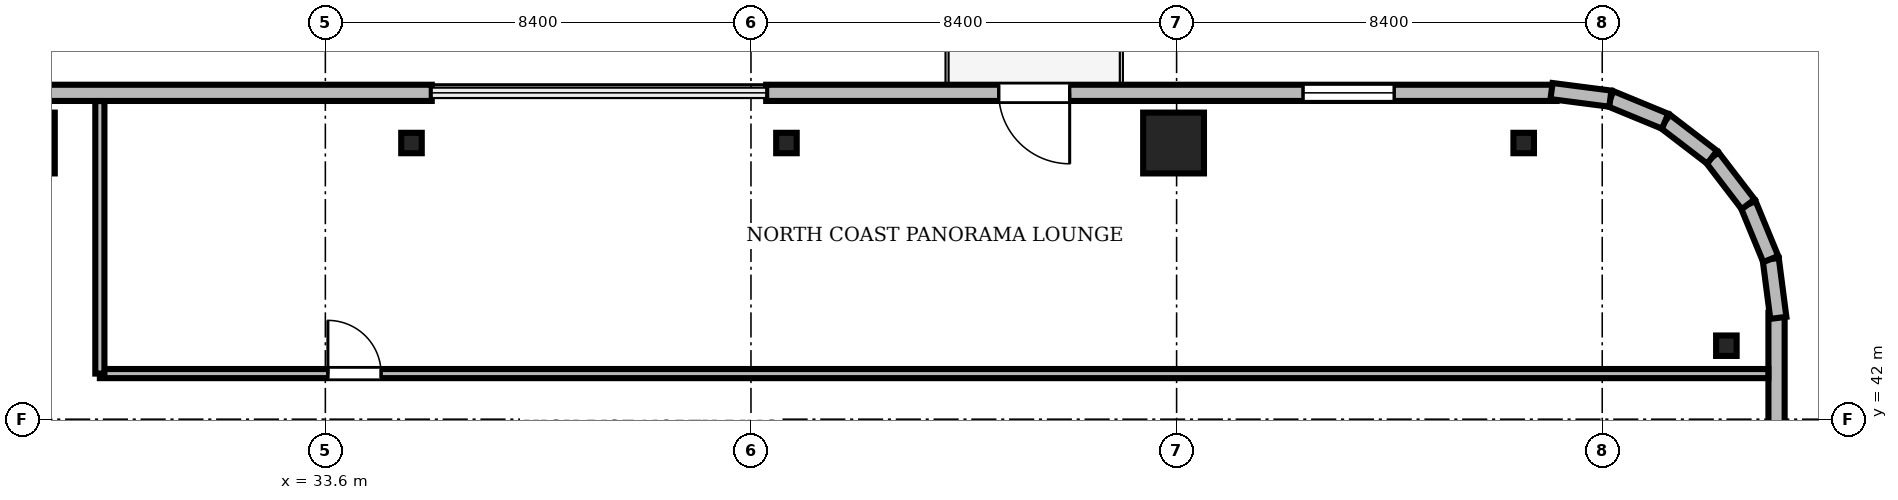
"""IFC4 building model, lengths in metres.
Left out: names, types, materials, properties, quantities, classifications, styles, units other than length and angle.
Written with IfcOpenShell. Run it as: python <this file> out.ifc"""

import sys

from ifc_helpers import new_model, si_unit, direction, frame, frame_2d, origin, origin_2d, place, context, subcontext, project, spatial, rectangle, i_section, extrude, source, transform, mapped, element, fill, save


model = new_model("IFC4")
c1 = context("Model", 3, precision=1e-05, world=origin(), true_north=direction((0.0, 1.0)))
c2 = subcontext(c1, "Body", "Model", "MODEL_VIEW")
j1 = project(units=[si_unit("LENGTHUNIT", "METRE"), si_unit("PLANEANGLEUNIT", "RADIAN")], contexts=[c1])
p1 = place(None, origin())
s1 = spatial("IfcSite", under=j1, at=p1, CompositionType="ELEMENT")
p2 = place(p1, origin())
s2 = spatial("IfcBuilding", under=s1, at=p2, CompositionType="ELEMENT")
p3 = place(p2, frame((0.0, 0.0, 250.6)))
s3 = spatial("IfcBuildingStorey", under=s2, at=p3, CompositionType="ELEMENT", Elevation=250.6)
m1 = source(origin(), c2, "Body", "SweptSolid", [
    extrude(rectangle(XDim=1.2, YDim=1.2, at=origin_2d()), origin(), (0.0, 0.0, 1.0), 3.65),
])
for number, where, z_axis, x_axis in (
    (1, (50.34, 47.45, 0.0), (0.0, 0.0, 1.0), (1.0, 0.0, 0.0)),
    (2, (27.66, 47.45, 0.0), (0.0, 0.0, 1.0), (1.0, 0.0, 0.0)),
):
    element("IfcColumn", number, at=place(p3, frame(where, z_axis=z_axis, x_axis=x_axis)), inside=s3, PredefinedType="COLUMN", context=c2, shape_type="MappedRepresentation", body=[
        mapped(m1, transform((0.0, 0.0, 0.0), scale=1.0)),
    ])
m2 = source(origin(), c2, "Body", "SweptSolid", [
    extrude(i_section(OverallWidth=0.405, OverallDepth=0.403, WebThickness=0.018, FlangeThickness=0.028, FilletRadius=0.015, at=origin_2d()), origin(), (0.0, 0.0, 1.0), 3.65),
])
for number, where, z_axis, x_axis in (
    (3, (61.25, 43.45, 0.0), (0.0, 0.0, 1.0), (1.0, 0.0, 0.0)),
    (4, (57.25, 47.45, 0.0), (0.0, 0.0, 1.0), (1.0, 0.0, 0.0)),
    (5, (42.7, 47.45, 0.0), (0.0, 0.0, 1.0), (1.0, 0.0, 0.0)),
    (6, (35.3, 47.45, 0.0), (0.0, 0.0, 1.0), (1.0, 0.0, 0.0)),
):
    element("IfcColumn", number, at=place(p3, frame(where, z_axis=z_axis, x_axis=x_axis)), inside=s3, PredefinedType="COLUMN", context=c2, shape_type="MappedRepresentation", body=[
        mapped(m2, transform((0.0, 0.0, 0.0), scale=1.0)),
    ])
m3 = source(origin(), c2, "Body", "SweptSolid", [
    extrude(rectangle(XDim=15.6, YDim=0.32, at=frame_2d((7.8, 0.0))), origin(), (0.0, 0.0, 1.0), 3.65),
])
p4 = place(p3, frame((57.9, 48.44, 0.0), z_axis=(0.0, 0.0, 1.0), x_axis=(-1.0, 0.0, 0.0)))
e7 = element("IfcWall", 7, at=p4, inside=s3, PredefinedType="SOLIDWALL", context=c2, shape_type="MappedRepresentation", body=[
    mapped(m3, transform((0.0, 0.0, 0.0), scale=1.0)),
])
m4 = source(origin(), c2, "Body", "SweptSolid", [
    extrude(rectangle(XDim=1.4, YDim=2.3, at=frame_2d((0.7, 1.15))), frame((0.0, 0.17, 0.0), z_axis=(0.0, -1.0, 0.0), x_axis=(1.0, 0.0, 0.0)), (0.0, 0.0, 1.0), 0.34),
])
p5 = place(p4, frame((9.61, 0.0, 0.0)))
e8 = element("IfcOpeningElement", 8, at=p5, cuts=e7, PredefinedType="OPENING", context=c2, shape_type="MappedRepresentation", body=[
    mapped(m4, transform((0.0, 0.0, 0.0), scale=1.0)),
])
m5 = source(origin(), c2, "Body", "SweptSolid", [
    extrude(rectangle(XDim=1.8, YDim=2.4, at=frame_2d((0.9, 1.2))), frame((0.0, 0.17, 0.0), z_axis=(0.0, -1.0, 0.0), x_axis=(1.0, 0.0, 0.0)), (0.0, 0.0, 1.0), 0.34),
])
p6 = place(p4, frame((3.205, 0.0, 0.72)))
e9 = element("IfcOpeningElement", 9, at=p6, cuts=e7, PredefinedType="OPENING", context=c2, shape_type="MappedRepresentation", body=[
    mapped(m5, transform((0.0, 0.0, 0.0), scale=1.0)),
])
p7 = place(p3, frame((35.7, 48.44, 0.0), z_axis=(0.0, 0.0, 1.0), x_axis=(-1.0, 0.0, 0.0)))
e10 = element("IfcWall", 10, at=p7, inside=s3, PredefinedType="SOLIDWALL", context=c2, shape_type="MappedRepresentation", body=[
    mapped(m3, transform((0.0, 0.0, 0.0), scale=1.0)),
])
p8 = place(p7, frame((10.595, 0.0, 0.72)))
e11 = element("IfcOpeningElement", 11, at=p8, cuts=e10, PredefinedType="OPENING", context=c2, shape_type="MappedRepresentation", body=[
    mapped(m5, transform((0.0, 0.0, 0.0), scale=1.0)),
])
m6 = source(origin(), c2, "Body", "SweptSolid", [
    extrude(rectangle(XDim=15.6, YDim=0.32, at=frame_2d((7.8, 0.0))), origin(), (0.0, 0.0, 1.0), 3.65),
])
p9 = place(p3, frame((62.24, 28.5, 0.0), z_axis=(0.0, 0.0, 1.0), x_axis=(0.0, 1.0, 0.0)))
e12 = element("IfcWall", 12, at=p9, inside=s3, PredefinedType="SOLIDWALL", context=c2, shape_type="MappedRepresentation", body=[
    mapped(m6, transform((0.0, 0.0, 0.0), scale=1.0)),
])
p10 = place(p9, frame((10.595, 0.0, 0.72)))
e13 = element("IfcOpeningElement", 13, at=p10, cuts=e12, PredefinedType="OPENING", context=c2, shape_type="MappedRepresentation", body=[
    mapped(m5, transform((0.0, 0.0, 0.0), scale=1.0)),
])
m7 = source(origin(), c2, "Body", "SweptSolid", [
    extrude(rectangle(XDim=1.17, YDim=0.32, at=frame_2d((0.585, 0.0))), origin(), (0.0, 0.0, 1.0), 3.65),
])
p11 = place(p3, frame((62.276, 44.0, 0.0), z_axis=(0.0, 0.0, 1.0), x_axis=(-0.128295670475, 0.991735963317, 0.0)))
e14 = element("IfcWall", 14, at=p11, inside=s3, PredefinedType="SOLIDWALL", context=c2, shape_type="MappedRepresentation", body=[
    mapped(m7, transform((0.0, 0.0, 0.0), scale=1.0)),
])
m8 = source(origin(), c2, "Body", "SweptSolid", [
    extrude(rectangle(XDim=1.169, YDim=0.32, at=frame_2d((0.584, 0.0))), origin(), (0.0, 0.0, 1.0), 3.65),
])
p12 = place(p3, frame((62.125, 45.16, 0.0), z_axis=(0.0, 0.0, 1.0), x_axis=(-0.381054331552, 0.924552646638, 0.0)))
e15 = element("IfcWall", 15, at=p12, inside=s3, PredefinedType="SOLIDWALL", context=c2, shape_type="MappedRepresentation", body=[
    mapped(m8, transform((0.0, 0.0, 0.0), scale=1.0)),
])
m9 = source(origin(), c2, "Body", "SweptSolid", [
    extrude(rectangle(XDim=1.169, YDim=0.32, at=frame_2d((0.584, 0.0))), origin(), (0.0, 0.0, 1.0), 3.65),
])
p13 = place(p3, frame((61.68, 46.241, 0.0), z_axis=(0.0, 0.0, 1.0), x_axis=(-0.608387696831, 0.793639975269, 0.0)))
e16 = element("IfcWall", 16, at=p13, inside=s3, PredefinedType="SOLIDWALL", context=c2, shape_type="MappedRepresentation", body=[
    mapped(m9, transform((0.0, 0.0, 0.0), scale=1.0)),
])
m10 = source(origin(), c2, "Body", "SweptSolid", [
    extrude(rectangle(XDim=1.169, YDim=0.32, at=frame_2d((0.584, 0.0))), origin(), (0.0, 0.0, 1.0), 3.65),
])
p14 = place(p3, frame((60.969, 47.169, 0.0), z_axis=(0.0, 0.0, 1.0), x_axis=(-0.793663520347, 0.608356981114, 0.0)))
e17 = element("IfcWall", 17, at=p14, inside=s3, PredefinedType="SOLIDWALL", context=c2, shape_type="MappedRepresentation", body=[
    mapped(m10, transform((0.0, 0.0, 0.0), scale=1.0)),
])
p15 = place(p3, frame((60.041, 47.88, 0.0), z_axis=(0.0, 0.0, 1.0), x_axis=(-0.924552646638, 0.381054331552, 0.0)))
e18 = element("IfcWall", 18, at=p15, inside=s3, PredefinedType="SOLIDWALL", context=c2, shape_type="MappedRepresentation", body=[
    mapped(m8, transform((0.0, 0.0, 0.0), scale=1.0)),
])
p16 = place(p3, frame((58.96, 48.325, 0.0), z_axis=(0.0, 0.0, 1.0), x_axis=(-0.991735963317, 0.128295670475, 0.0)))
e19 = element("IfcWall", 19, at=p16, inside=s3, PredefinedType="SOLIDWALL", context=c2, shape_type="MappedRepresentation", body=[
    mapped(m7, transform((0.0, 0.0, 0.0), scale=1.0)),
])
m11 = source(origin(), c2, "Body", "SweptSolid", [
    extrude(rectangle(XDim=32.928, YDim=0.18, at=frame_2d((16.464, 0.0))), origin(), (0.0, 0.0, 1.0), 2.892),
])
p17 = place(p3, frame((29.15, 42.9, 0.0), z_axis=(0.0, 0.0, 1.0), x_axis=(1.0, 0.0, 0.0)))
e20 = element("IfcWall", 20, at=p17, inside=s3, PredefinedType="PARTITIONING", context=c2, shape_type="MappedRepresentation", body=[
    mapped(m11, transform((0.0, 0.0, 0.0), scale=1.0)),
])
m12 = source(origin(), c2, "Body", "SweptSolid", [
    extrude(rectangle(XDim=1.05, YDim=2.2, at=frame_2d((0.525, 1.1))), frame((0.0, 0.1, 0.0), z_axis=(0.0, -1.0, 0.0), x_axis=(1.0, 0.0, 0.0)), (0.0, 0.0, 1.0), 0.2),
])
p18 = place(p17, frame((4.5, 0.0, 0.0)))
e21 = element("IfcOpeningElement", 21, at=p18, cuts=e20, PredefinedType="OPENING", context=c2, shape_type="MappedRepresentation", body=[
    mapped(m12, transform((0.0, 0.0, 0.0), scale=1.0)),
])
m13 = source(origin(), c2, "Body", "SweptSolid", [
    extrude(rectangle(XDim=5.378, YDim=0.18, at=frame_2d((2.689, 0.0))), origin(), (0.0, 0.0, 1.0), 2.892),
])
p19 = place(p3, frame((29.15, 42.9, 0.0), z_axis=(0.0, 0.0, 1.0), x_axis=(0.0, 1.0, 0.0)))
e22 = element("IfcWall", 22, at=p19, inside=s3, PredefinedType="PARTITIONING", context=c2, shape_type="MappedRepresentation", body=[
    mapped(m13, transform((0.0, 0.0, 0.0), scale=1.0)),
])
m14 = source(origin(), c2, "Body", "SweptSolid", [
    extrude(rectangle(XDim=1.4, YDim=2.3, at=frame_2d((0.7, 1.15))), frame((0.0, 0.025, 0.0), z_axis=(0.0, -1.0, 0.0), x_axis=(1.0, 0.0, 0.0)), (0.0, 0.0, 1.0), 0.05),
])
p20 = place(p5, frame((1.4, 0.0, 0.0), z_axis=(0.0, 0.0, 1.0), x_axis=(-1.0, 0.0, 0.0)))
e23 = element("IfcDoor", 23, at=p20, inside=s3, OperationType="DOUBLE_DOOR_SLIDING", PredefinedType="DOOR", context=c2, shape_type="MappedRepresentation", body=[
    mapped(m14, transform((0.0, 0.0, 0.0), scale=1.0)),
])
fill(e8, e23)
m15 = source(origin(), c2, "Body", "SweptSolid", [
    extrude(rectangle(XDim=1.8, YDim=2.4, at=frame_2d((0.9, 1.2))), frame((0.0, 0.03, 0.0), z_axis=(0.0, -1.0, 0.0), x_axis=(1.0, 0.0, 0.0)), (0.0, 0.0, 1.0), 0.06),
])
p21 = place(p6, origin())
e24 = element("IfcWindow", 24, at=p21, inside=s3, PartitioningType="SINGLE_PANEL", PredefinedType="WINDOW", context=c2, shape_type="MappedRepresentation", body=[
    mapped(m15, transform((0.0, 0.0, 0.0), scale=1.0)),
])
fill(e9, e24)
m16 = source(origin(), c2, "Body", "SweptSolid", [
    extrude(rectangle(XDim=1.05, YDim=2.2, at=frame_2d((0.525, 1.1))), frame((0.0, 0.025, 0.0), z_axis=(0.0, -1.0, 0.0), x_axis=(1.0, 0.0, 0.0)), (0.0, 0.0, 1.0), 0.05),
])
p22 = place(p18, origin())
e25 = element("IfcDoor", 25, at=p22, inside=s3, OperationType="SINGLE_SWING_LEFT", PredefinedType="DOOR", context=c2, shape_type="MappedRepresentation", body=[
    mapped(m16, transform((0.0, 0.0, 0.0), scale=1.0)),
])
fill(e21, e25)
save(model, sys.argv[1])
